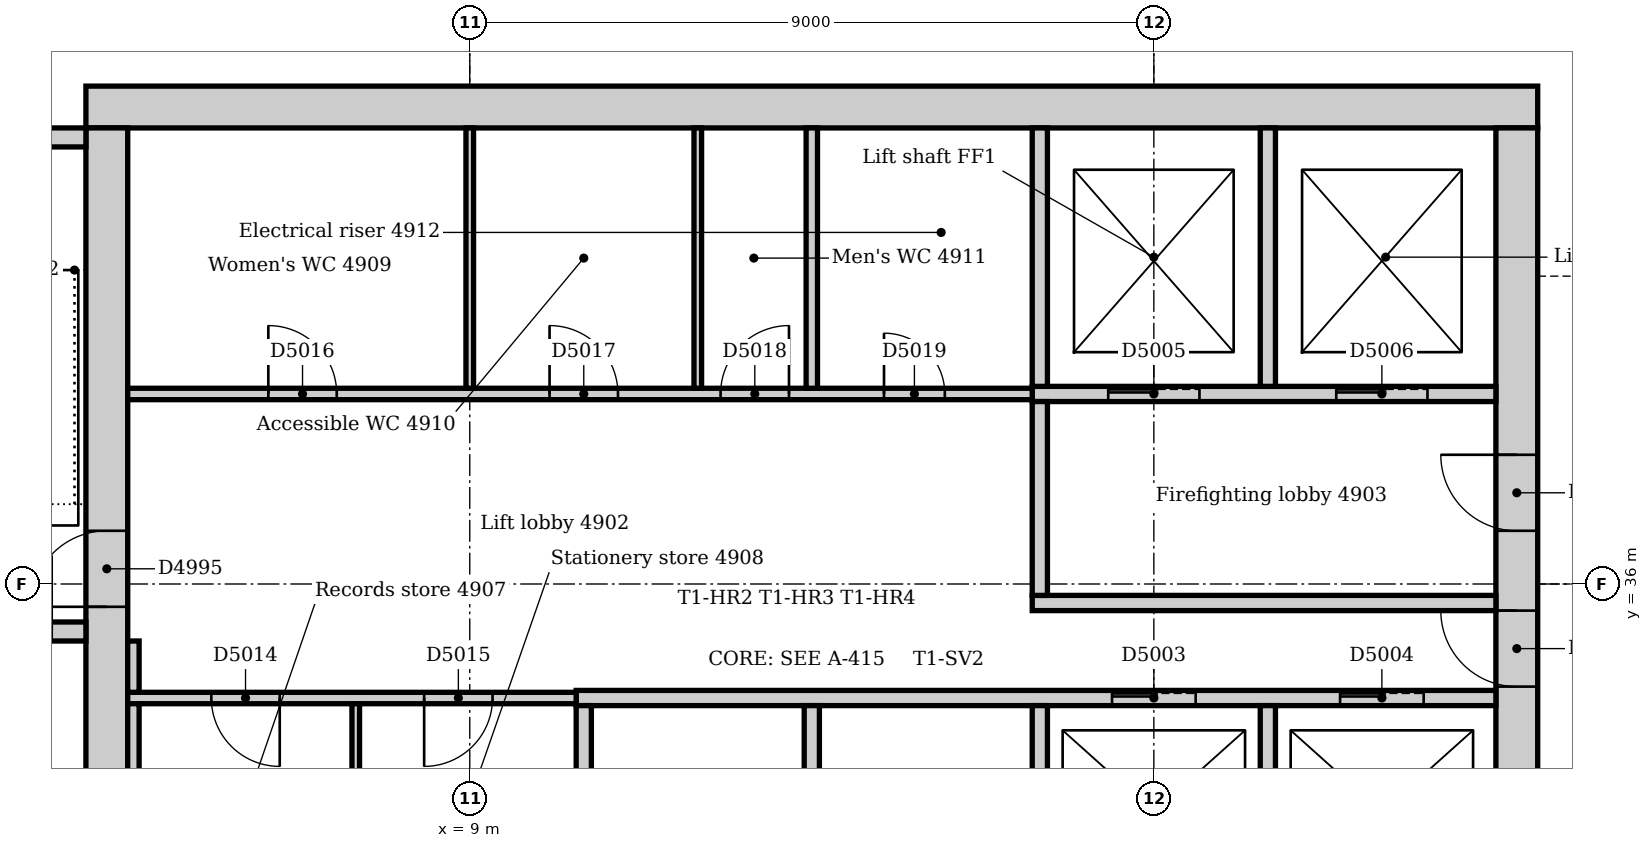
"""IFC4 building model, lengths in metres.
Left out: names, types, materials, properties, quantities, classifications, styles, units other than length and angle.
Written with IfcOpenShell. Run it as: python <this file> out.ifc"""

import sys

from ifc_helpers import new_model, si_unit, direction, frame, frame_2d, origin, place, context, subcontext, project, spatial, rectangle, extrude, element, fill, save


model = new_model("IFC4")
c1 = context("Model", 3, precision=1e-05, world=origin(), true_north=direction((0.0, 1.0)))
c2 = subcontext(c1, "Body", "Model", "MODEL_VIEW")
j1 = project(units=[si_unit("LENGTHUNIT", "METRE"), si_unit("PLANEANGLEUNIT", "RADIAN")], contexts=[c1])
p1 = place(None, origin())
s1 = spatial("IfcSite", under=j1, at=p1, CompositionType="ELEMENT")
p2 = place(p1, origin())
s2 = spatial("IfcBuilding", under=s1, at=p2, CompositionType="ELEMENT")
p3 = place(p2, frame((0.0, 0.0, 206.0)))
s3 = spatial("IfcBuildingStorey", under=s2, at=p3, CompositionType="ELEMENT", Elevation=206.0)
p4 = place(p3, frame((23.05, 42.275, 0.0), z_axis=(0.0, 0.0, 1.0), x_axis=(-1.0, 0.0, 0.0)))
e1 = element("IfcWall", 1, at=p4, inside=s3, PredefinedType="SOLIDWALL", context=c2, shape_type="SweptSolid", body=[
    extrude(rectangle(XDim=19.1, YDim=0.55, at=frame_2d((9.55, 0.0))), origin(), (0.0, 0.0, 1.0), 4.0),
])
p5 = place(p3, frame((22.775, 31.5, 0.0), z_axis=(0.0, 0.0, 1.0), x_axis=(0.0, 1.0, 0.0)))
e2 = element("IfcWall", 2, at=p5, inside=s3, PredefinedType="SOLIDWALL", context=c2, shape_type="SweptSolid", body=[
    extrude(rectangle(XDim=10.5, YDim=0.55, at=frame_2d((5.25, 0.0))), origin(), (0.0, 0.0, 1.0), 4.0),
])
p6 = place(p5, frame((3.15, 0.0, 0.0)))
e3 = element("IfcOpeningElement", 3, at=p6, cuts=e2, PredefinedType="OPENING", context=c2, shape_type="SweptSolid", body=[
    extrude(rectangle(XDim=1.0, YDim=2.1, at=frame_2d((0.5, 1.05))), frame((0.0, 0.285, 0.0), z_axis=(0.0, -1.0, 0.0), x_axis=(1.0, 0.0, 0.0)), (0.0, 0.0, 1.0), 0.57),
])
p7 = place(p5, frame((5.2, 0.0, 0.0)))
e4 = element("IfcOpeningElement", 4, at=p7, cuts=e2, PredefinedType="OPENING", context=c2, shape_type="SweptSolid", body=[
    extrude(rectangle(XDim=1.0, YDim=2.1, at=frame_2d((0.5, 1.05))), frame((0.0, 0.285, 0.0), z_axis=(0.0, -1.0, 0.0), x_axis=(1.0, 0.0, 0.0)), (0.0, 0.0, 1.0), 0.57),
])
p8 = place(p3, frame((4.225, 42.0, 0.0), z_axis=(0.0, 0.0, 1.0), x_axis=(0.0, -1.0, 0.0)))
e5 = element("IfcWall", 5, at=p8, inside=s3, PredefinedType="SOLIDWALL", context=c2, shape_type="SweptSolid", body=[
    extrude(rectangle(XDim=10.5, YDim=0.55, at=frame_2d((5.25, 0.0))), origin(), (0.0, 0.0, 1.0), 4.0),
])
p9 = place(p8, frame((5.3, 0.0, 0.0)))
e6 = element("IfcOpeningElement", 6, at=p9, cuts=e5, PredefinedType="OPENING", context=c2, shape_type="SweptSolid", body=[
    extrude(rectangle(XDim=1.0, YDim=2.1, at=frame_2d((0.5, 1.05))), frame((0.0, 0.285, 0.0), z_axis=(0.0, -1.0, 0.0), x_axis=(1.0, 0.0, 0.0)), (0.0, 0.0, 1.0), 0.57),
])
p10 = place(p3, frame((0.36, 35.375, 0.0), z_axis=(0.0, 0.0, 1.0), x_axis=(1.0, 0.0, 0.0)))
e7 = element("IfcWall", 7, at=p10, inside=s3, PredefinedType="SOLIDWALL", context=c2, shape_type="SweptSolid", body=[
    extrude(rectangle(XDim=3.59, YDim=0.25, at=frame_2d((1.795, 0.0))), origin(), (0.0, 0.0, 1.0), 4.0),
])
p11 = place(p10, frame((2.14, 0.0, 0.0)))
e8 = element("IfcOpeningElement", 8, at=p11, cuts=e7, PredefinedType="OPENING", context=c2, shape_type="SweptSolid", body=[
    extrude(rectangle(XDim=1.0, YDim=2.1, at=frame_2d((0.5, 1.05))), frame((0.0, 0.135, 0.0), z_axis=(0.0, -1.0, 0.0), x_axis=(1.0, 0.0, 0.0)), (0.0, 0.0, 1.0), 0.27),
])
p12 = place(p3, frame((3.95, 41.875, 0.0), z_axis=(0.0, 0.0, 1.0), x_axis=(-1.0, 0.0, 0.0)))
e9 = element("IfcWall", 9, at=p12, inside=s3, PredefinedType="SOLIDWALL", context=c2, shape_type="SweptSolid", body=[
    extrude(rectangle(XDim=3.59, YDim=0.25, at=frame_2d((1.795, 0.0))), origin(), (0.0, 0.0, 1.0), 4.0),
])
p13 = place(p3, frame((16.4, 35.75, 0.0), z_axis=(0.0, 0.0, 1.0), x_axis=(1.0, 0.0, 0.0)))
e10 = element("IfcWall", 10, at=p13, inside=s3, PredefinedType="PARTITIONING", context=c2, shape_type="SweptSolid", body=[
    extrude(rectangle(XDim=6.1, YDim=0.2, at=frame_2d((3.05, 0.0))), origin(), (0.0, 0.0, 1.0), 3.85),
])
p14 = place(p3, frame((16.4, 38.5, 0.0), z_axis=(0.0, 0.0, 1.0), x_axis=(1.0, 0.0, 0.0)))
e11 = element("IfcWall", 11, at=p14, inside=s3, PredefinedType="PARTITIONING", context=c2, shape_type="SweptSolid", body=[
    extrude(rectangle(XDim=6.1, YDim=0.2, at=frame_2d((3.05, 0.0))), origin(), (0.0, 0.0, 1.0), 3.85),
])
p15 = place(p14, frame((1.0, 0.0, 0.0)))
e12 = element("IfcOpeningElement", 12, at=p15, cuts=e11, PredefinedType="OPENING", context=c2, shape_type="SweptSolid", body=[
    extrude(rectangle(XDim=1.2, YDim=2.1, at=frame_2d((0.6, 1.05))), frame((0.0, 0.11, 0.0), z_axis=(0.0, -1.0, 0.0), x_axis=(1.0, 0.0, 0.0)), (0.0, 0.0, 1.0), 0.22),
])
p16 = place(p14, frame((4.0, 0.0, 0.0)))
e13 = element("IfcOpeningElement", 13, at=p16, cuts=e11, PredefinedType="OPENING", context=c2, shape_type="SweptSolid", body=[
    extrude(rectangle(XDim=1.2, YDim=2.1, at=frame_2d((0.6, 1.05))), frame((0.0, 0.11, 0.0), z_axis=(0.0, -1.0, 0.0), x_axis=(1.0, 0.0, 0.0)), (0.0, 0.0, 1.0), 0.22),
])
p17 = place(p3, frame((16.5, 35.85, 0.0), z_axis=(0.0, 0.0, 1.0), x_axis=(0.0, 1.0, 0.0)))
e14 = element("IfcWall", 14, at=p17, inside=s3, PredefinedType="PARTITIONING", context=c2, shape_type="SweptSolid", body=[
    extrude(rectangle(XDim=2.55, YDim=0.2, at=frame_2d((1.275, 0.0))), origin(), (0.0, 0.0, 1.0), 3.85),
])
p18 = place(p3, frame((10.4, 34.5, 0.0), z_axis=(0.0, 0.0, 1.0), x_axis=(1.0, 0.0, 0.0)))
e15 = element("IfcWall", 15, at=p18, inside=s3, PredefinedType="PARTITIONING", context=c2, shape_type="SweptSolid", body=[
    extrude(rectangle(XDim=12.1, YDim=0.2, at=frame_2d((6.05, 0.0))), origin(), (0.0, 0.0, 1.0), 3.85),
])
p19 = place(p18, frame((7.05, 0.0, 0.0)))
e16 = element("IfcOpeningElement", 16, at=p19, cuts=e15, PredefinedType="OPENING", context=c2, shape_type="SweptSolid", body=[
    extrude(rectangle(XDim=1.1, YDim=2.1, at=frame_2d((0.55, 1.05))), frame((0.0, 0.11, 0.0), z_axis=(0.0, -1.0, 0.0), x_axis=(1.0, 0.0, 0.0)), (0.0, 0.0, 1.0), 0.22),
])
p20 = place(p18, frame((10.05, 0.0, 0.0)))
e17 = element("IfcOpeningElement", 17, at=p20, cuts=e15, PredefinedType="OPENING", context=c2, shape_type="SweptSolid", body=[
    extrude(rectangle(XDim=1.1, YDim=2.1, at=frame_2d((0.55, 1.05))), frame((0.0, 0.11, 0.0), z_axis=(0.0, -1.0, 0.0), x_axis=(1.0, 0.0, 0.0)), (0.0, 0.0, 1.0), 0.22),
])
for number, where, z_axis, x_axis in (
    (18, (10.5, 31.75, 0.0), (0.0, 0.0, 1.0), (0.0, 1.0, 0.0)),
    (19, (13.5, 31.75, 0.0), (0.0, 0.0, 1.0), (0.0, 1.0, 0.0)),
    (20, (16.5, 31.75, 0.0), (0.0, 0.0, 1.0), (0.0, 1.0, 0.0)),
    (21, (19.5, 31.75, 0.0), (0.0, 0.0, 1.0), (0.0, 1.0, 0.0)),
):
    element("IfcWall", number, at=place(p3, frame(where, z_axis=z_axis, x_axis=x_axis)), inside=s3, PredefinedType="PARTITIONING", context=c2, shape_type="SweptSolid", body=[
        extrude(rectangle(XDim=2.65, YDim=0.2, at=frame_2d((1.325, 0.0))), origin(), (0.0, 0.0, 1.0), 3.85),
    ])
for number, where, z_axis, x_axis in (
    (22, (16.5, 38.6, 0.0), (0.0, 0.0, 1.0), (0.0, 1.0, 0.0)),
    (23, (19.5, 38.6, 0.0), (0.0, 0.0, 1.0), (0.0, 1.0, 0.0)),
):
    element("IfcWall", number, at=place(p3, frame(where, z_axis=z_axis, x_axis=x_axis)), inside=s3, PredefinedType="PARTITIONING", context=c2, shape_type="SweptSolid", body=[
        extrude(rectangle(XDim=3.4, YDim=0.2, at=frame_2d((1.7, 0.0))), origin(), (0.0, 0.0, 1.0), 3.85),
    ])
p21 = place(p3, frame((4.5, 38.5, 0.0), z_axis=(0.0, 0.0, 1.0), x_axis=(1.0, 0.0, 0.0)))
e24 = element("IfcWall", 24, at=p21, inside=s3, PredefinedType="PARTITIONING", context=c2, shape_type="SweptSolid", body=[
    extrude(rectangle(XDim=11.9, YDim=0.15, at=frame_2d((5.95, 0.0))), origin(), (0.0, 0.0, 1.0), 3.85),
])
p22 = place(p21, frame((1.85, 0.0, 0.0)))
e25 = element("IfcOpeningElement", 25, at=p22, cuts=e24, PredefinedType="OPENING", context=c2, shape_type="SweptSolid", body=[
    extrude(rectangle(XDim=0.9, YDim=2.1, at=frame_2d((0.45, 1.05))), frame((0.0, 0.085, 0.0), z_axis=(0.0, -1.0, 0.0), x_axis=(1.0, 0.0, 0.0)), (0.0, 0.0, 1.0), 0.17),
])
p23 = place(p21, frame((5.55, 0.0, 0.0)))
e26 = element("IfcOpeningElement", 26, at=p23, cuts=e24, PredefinedType="OPENING", context=c2, shape_type="SweptSolid", body=[
    extrude(rectangle(XDim=0.9, YDim=2.1, at=frame_2d((0.45, 1.05))), frame((0.0, 0.085, 0.0), z_axis=(0.0, -1.0, 0.0), x_axis=(1.0, 0.0, 0.0)), (0.0, 0.0, 1.0), 0.17),
])
p24 = place(p21, frame((7.8, 0.0, 0.0)))
e27 = element("IfcOpeningElement", 27, at=p24, cuts=e24, PredefinedType="OPENING", context=c2, shape_type="SweptSolid", body=[
    extrude(rectangle(XDim=0.9, YDim=2.1, at=frame_2d((0.45, 1.05))), frame((0.0, 0.085, 0.0), z_axis=(0.0, -1.0, 0.0), x_axis=(1.0, 0.0, 0.0)), (0.0, 0.0, 1.0), 0.17),
])
p25 = place(p21, frame((9.95, 0.0, 0.0)))
e28 = element("IfcOpeningElement", 28, at=p25, cuts=e24, PredefinedType="OPENING", context=c2, shape_type="SweptSolid", body=[
    extrude(rectangle(XDim=0.8, YDim=2.1, at=frame_2d((0.4, 1.05))), frame((0.0, 0.085, 0.0), z_axis=(0.0, -1.0, 0.0), x_axis=(1.0, 0.0, 0.0)), (0.0, 0.0, 1.0), 0.17),
])
p26 = place(p3, frame((4.5, 34.5, 0.0), z_axis=(0.0, 0.0, 1.0), x_axis=(1.0, 0.0, 0.0)))
e29 = element("IfcWall", 29, at=p26, inside=s3, PredefinedType="PARTITIONING", context=c2, shape_type="SweptSolid", body=[
    extrude(rectangle(XDim=5.9, YDim=0.15, at=frame_2d((2.95, 0.0))), origin(), (0.0, 0.0, 1.0), 3.85),
])
p27 = place(p26, frame((1.1, 0.0, 0.0)))
e30 = element("IfcOpeningElement", 30, at=p27, cuts=e29, PredefinedType="OPENING", context=c2, shape_type="SweptSolid", body=[
    extrude(rectangle(XDim=0.9, YDim=2.1, at=frame_2d((0.45, 1.05))), frame((0.0, 0.085, 0.0), z_axis=(0.0, -1.0, 0.0), x_axis=(1.0, 0.0, 0.0)), (0.0, 0.0, 1.0), 0.17),
])
p28 = place(p26, frame((3.9, 0.0, 0.0)))
e31 = element("IfcOpeningElement", 31, at=p28, cuts=e29, PredefinedType="OPENING", context=c2, shape_type="SweptSolid", body=[
    extrude(rectangle(XDim=0.9, YDim=2.1, at=frame_2d((0.45, 1.05))), frame((0.0, 0.085, 0.0), z_axis=(0.0, -1.0, 0.0), x_axis=(1.0, 0.0, 0.0)), (0.0, 0.0, 1.0), 0.17),
])
p29 = place(p3, frame((4.575, 34.575, 0.0), z_axis=(0.0, 0.0, 1.0), x_axis=(0.0, 1.0, 0.0)))
e32 = element("IfcWall", 32, at=p29, inside=s3, PredefinedType="PARTITIONING", context=c2, shape_type="SweptSolid", body=[
    extrude(rectangle(XDim=0.675, YDim=0.15, at=frame_2d((0.338, 0.0))), origin(), (0.0, 0.0, 1.0), 3.85),
])
p30 = place(p3, frame((4.575, 31.75, 0.0), z_axis=(0.0, 0.0, 1.0), x_axis=(0.0, 1.0, 0.0)))
e33 = element("IfcWall", 33, at=p30, inside=s3, PredefinedType="PARTITIONING", context=c2, shape_type="SweptSolid", body=[
    extrude(rectangle(XDim=2.675, YDim=0.15, at=frame_2d((1.337, 0.0))), origin(), (0.0, 0.0, 1.0), 3.85),
])
p31 = place(p3, frame((13.5, 38.575, 0.0), z_axis=(0.0, 0.0, 1.0), x_axis=(0.0, 1.0, 0.0)))
e34 = element("IfcWall", 34, at=p31, inside=s3, PredefinedType="PARTITIONING", context=c2, shape_type="SweptSolid", body=[
    extrude(rectangle(XDim=3.425, YDim=0.15, at=frame_2d((1.712, 0.0))), origin(), (0.0, 0.0, 1.0), 3.85),
])
for number, where, z_axis, x_axis in (
    (35, (9.0, 38.575, 0.0), (0.0, 0.0, 1.0), (0.0, 1.0, 0.0)),
    (36, (12.0, 38.575, 0.0), (0.0, 0.0, 1.0), (0.0, 1.0, 0.0)),
):
    element("IfcWall", number, at=place(p3, frame(where, z_axis=z_axis, x_axis=x_axis)), inside=s3, PredefinedType="PARTITIONING", context=c2, shape_type="SweptSolid", body=[
        extrude(rectangle(XDim=3.425, YDim=0.1, at=frame_2d((1.712, 0.0))), origin(), (0.0, 0.0, 1.0), 3.85),
    ])
p32 = place(p3, frame((7.5, 31.75, 0.0), z_axis=(0.0, 0.0, 1.0), x_axis=(0.0, 1.0, 0.0)))
e37 = element("IfcWall", 37, at=p32, inside=s3, PredefinedType="PARTITIONING", context=c2, shape_type="SweptSolid", body=[
    extrude(rectangle(XDim=2.675, YDim=0.1, at=frame_2d((1.337, 0.0))), origin(), (0.0, 0.0, 1.0), 3.85),
])
p33 = place(p9, frame((1.0, 0.0, 0.0), z_axis=(0.0, 0.0, 1.0), x_axis=(-1.0, 0.0, 0.0)))
e38 = element("IfcDoor", 38, at=p33, inside=s3, OperationType="SINGLE_SWING_LEFT", PredefinedType="DOOR", context=c2, shape_type="SweptSolid", body=[
    extrude(rectangle(XDim=1.0, YDim=2.1, at=frame_2d((0.5, 1.05))), frame((0.0, 0.025, 0.0), z_axis=(0.0, -1.0, 0.0), x_axis=(1.0, 0.0, 0.0)), (0.0, 0.0, 1.0), 0.05),
])
fill(e6, e38)
p34 = place(p19, origin())
e39 = element("IfcDoor", 39, at=p34, inside=s3, OperationType="SLIDING_TO_LEFT", PredefinedType="DOOR", context=c2, shape_type="SweptSolid", body=[
    extrude(rectangle(XDim=1.1, YDim=2.1, at=frame_2d((0.55, 1.05))), frame((0.0, 0.025, 0.0), z_axis=(0.0, -1.0, 0.0), x_axis=(1.0, 0.0, 0.0)), (0.0, 0.0, 1.0), 0.05),
])
fill(e16, e39)
p35 = place(p20, origin())
e40 = element("IfcDoor", 40, at=p35, inside=s3, OperationType="SLIDING_TO_LEFT", PredefinedType="DOOR", context=c2, shape_type="SweptSolid", body=[
    extrude(rectangle(XDim=1.1, YDim=2.1, at=frame_2d((0.55, 1.05))), frame((0.0, 0.025, 0.0), z_axis=(0.0, -1.0, 0.0), x_axis=(1.0, 0.0, 0.0)), (0.0, 0.0, 1.0), 0.05),
])
fill(e17, e40)
p36 = place(p15, origin())
e41 = element("IfcDoor", 41, at=p36, inside=s3, OperationType="SLIDING_TO_LEFT", PredefinedType="DOOR", context=c2, shape_type="SweptSolid", body=[
    extrude(rectangle(XDim=1.2, YDim=2.1, at=frame_2d((0.6, 1.05))), frame((0.0, 0.025, 0.0), z_axis=(0.0, -1.0, 0.0), x_axis=(1.0, 0.0, 0.0)), (0.0, 0.0, 1.0), 0.05),
])
fill(e12, e41)
p37 = place(p16, origin())
e42 = element("IfcDoor", 42, at=p37, inside=s3, OperationType="SLIDING_TO_LEFT", PredefinedType="DOOR", context=c2, shape_type="SweptSolid", body=[
    extrude(rectangle(XDim=1.2, YDim=2.1, at=frame_2d((0.6, 1.05))), frame((0.0, 0.025, 0.0), z_axis=(0.0, -1.0, 0.0), x_axis=(1.0, 0.0, 0.0)), (0.0, 0.0, 1.0), 0.05),
])
fill(e13, e42)
p38 = place(p6, origin())
e43 = element("IfcDoor", 43, at=p38, inside=s3, OperationType="SINGLE_SWING_RIGHT", PredefinedType="DOOR", context=c2, shape_type="SweptSolid", body=[
    extrude(rectangle(XDim=1.0, YDim=2.1, at=frame_2d((0.5, 1.05))), frame((0.0, 0.025, 0.0), z_axis=(0.0, -1.0, 0.0), x_axis=(1.0, 0.0, 0.0)), (0.0, 0.0, 1.0), 0.05),
])
fill(e3, e43)
p39 = place(p7, origin())
e44 = element("IfcDoor", 44, at=p39, inside=s3, OperationType="SINGLE_SWING_RIGHT", PredefinedType="DOOR", context=c2, shape_type="SweptSolid", body=[
    extrude(rectangle(XDim=1.0, YDim=2.1, at=frame_2d((0.5, 1.05))), frame((0.0, 0.025, 0.0), z_axis=(0.0, -1.0, 0.0), x_axis=(1.0, 0.0, 0.0)), (0.0, 0.0, 1.0), 0.05),
])
fill(e4, e44)
p40 = place(p27, frame((0.9, 0.0, 0.0), z_axis=(0.0, 0.0, 1.0), x_axis=(-1.0, 0.0, 0.0)))
e45 = element("IfcDoor", 45, at=p40, inside=s3, OperationType="SINGLE_SWING_LEFT", PredefinedType="DOOR", context=c2, shape_type="SweptSolid", body=[
    extrude(rectangle(XDim=0.9, YDim=2.1, at=frame_2d((0.45, 1.05))), frame((0.0, 0.025, 0.0), z_axis=(0.0, -1.0, 0.0), x_axis=(1.0, 0.0, 0.0)), (0.0, 0.0, 1.0), 0.05),
])
fill(e30, e45)
p41 = place(p28, frame((0.9, 0.0, 0.0), z_axis=(0.0, 0.0, 1.0), x_axis=(-1.0, 0.0, 0.0)))
e46 = element("IfcDoor", 46, at=p41, inside=s3, OperationType="SINGLE_SWING_RIGHT", PredefinedType="DOOR", context=c2, shape_type="SweptSolid", body=[
    extrude(rectangle(XDim=0.9, YDim=2.1, at=frame_2d((0.45, 1.05))), frame((0.0, 0.025, 0.0), z_axis=(0.0, -1.0, 0.0), x_axis=(1.0, 0.0, 0.0)), (0.0, 0.0, 1.0), 0.05),
])
fill(e31, e46)
p42 = place(p22, origin())
e47 = element("IfcDoor", 47, at=p42, inside=s3, OperationType="SINGLE_SWING_LEFT", PredefinedType="DOOR", context=c2, shape_type="SweptSolid", body=[
    extrude(rectangle(XDim=0.9, YDim=2.1, at=frame_2d((0.45, 1.05))), frame((0.0, 0.025, 0.0), z_axis=(0.0, -1.0, 0.0), x_axis=(1.0, 0.0, 0.0)), (0.0, 0.0, 1.0), 0.05),
])
fill(e25, e47)
p43 = place(p23, origin())
e48 = element("IfcDoor", 48, at=p43, inside=s3, OperationType="SINGLE_SWING_LEFT", PredefinedType="DOOR", context=c2, shape_type="SweptSolid", body=[
    extrude(rectangle(XDim=0.9, YDim=2.1, at=frame_2d((0.45, 1.05))), frame((0.0, 0.025, 0.0), z_axis=(0.0, -1.0, 0.0), x_axis=(1.0, 0.0, 0.0)), (0.0, 0.0, 1.0), 0.05),
])
fill(e26, e48)
p44 = place(p24, origin())
e49 = element("IfcDoor", 49, at=p44, inside=s3, OperationType="SINGLE_SWING_RIGHT", PredefinedType="DOOR", context=c2, shape_type="SweptSolid", body=[
    extrude(rectangle(XDim=0.9, YDim=2.1, at=frame_2d((0.45, 1.05))), frame((0.0, 0.025, 0.0), z_axis=(0.0, -1.0, 0.0), x_axis=(1.0, 0.0, 0.0)), (0.0, 0.0, 1.0), 0.05),
])
fill(e27, e49)
p45 = place(p25, origin())
e50 = element("IfcDoor", 50, at=p45, inside=s3, OperationType="SINGLE_SWING_LEFT", PredefinedType="DOOR", context=c2, shape_type="SweptSolid", body=[
    extrude(rectangle(XDim=0.8, YDim=2.1, at=frame_2d((0.4, 1.05))), frame((0.0, 0.025, 0.0), z_axis=(0.0, -1.0, 0.0), x_axis=(1.0, 0.0, 0.0)), (0.0, 0.0, 1.0), 0.05),
])
fill(e28, e50)
save(model, sys.argv[1])
